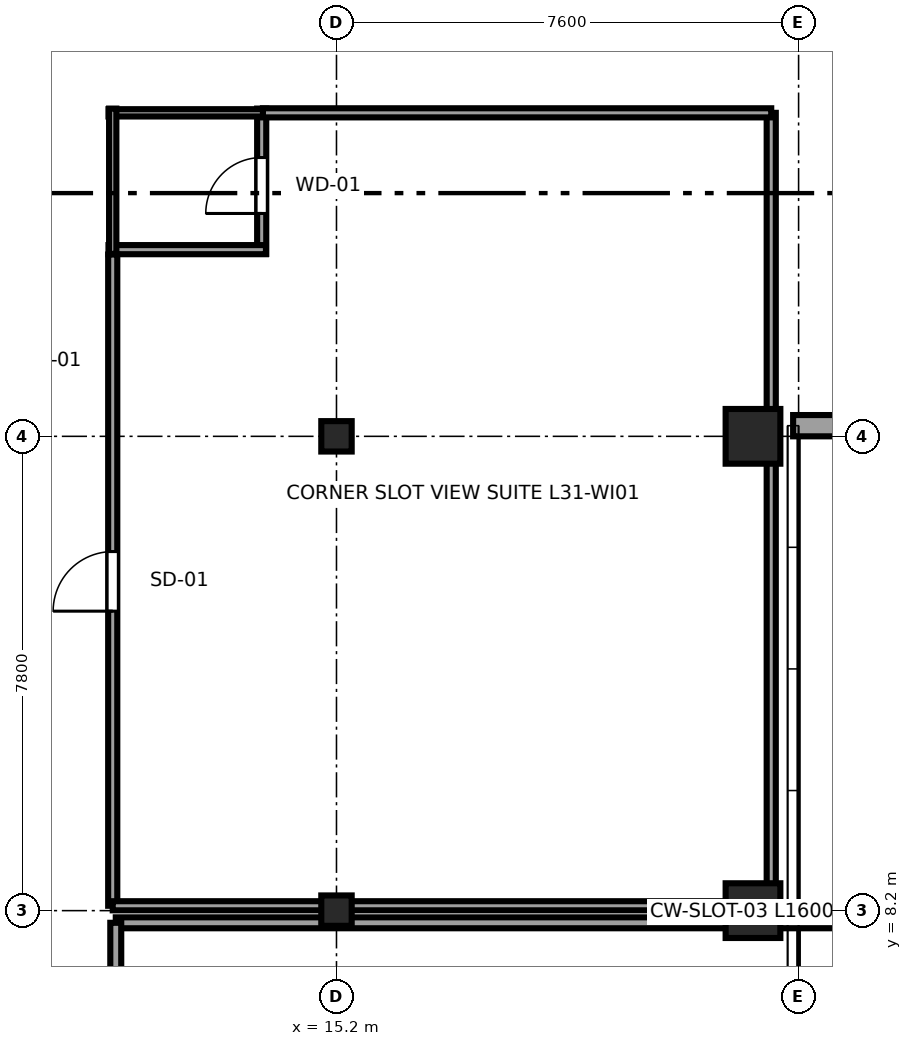
"""IFC4 building model, lengths in metres.
Left out: names, types, materials, properties, quantities, classifications, styles, units other than length and angle.
Written with IfcOpenShell. Run it as: python <this file> out.ifc"""

import sys

from ifc_helpers import new_model, si_unit, direction, frame, frame_2d, origin, origin_2d, place, context, subcontext, project, spatial, rectangle, i_section, extrude, source, transform, mapped, element, fill, save


model = new_model("IFC4")
c1 = context("Model", 3, precision=1e-05, world=origin(), true_north=direction((0.0, 1.0)))
c2 = subcontext(c1, "Body", "Model", "MODEL_VIEW")
j1 = project(units=[si_unit("LENGTHUNIT", "METRE"), si_unit("PLANEANGLEUNIT", "RADIAN")], contexts=[c1])
p1 = place(None, origin())
s1 = spatial("IfcSite", under=j1, at=p1, CompositionType="ELEMENT")
p2 = place(p1, origin())
s2 = spatial("IfcBuilding", under=s1, at=p2, CompositionType="ELEMENT")
p3 = place(p2, frame((0.0, 0.0, 122.2)))
s3 = spatial("IfcBuildingStorey", under=s2, at=p3, CompositionType="ELEMENT", Elevation=122.2)
m1 = source(origin(), c2, "Body", "SweptSolid", [
    extrude(i_section(OverallWidth=0.5, OverallDepth=0.5, WebThickness=0.022, FlangeThickness=0.034, at=origin_2d()), origin(), (0.0, 0.0, 1.0), 3.55),
])
for number, where, z_axis, x_axis in (
    (1, (15.2, 8.2, 0.0), (0.0, 0.0, 1.0), (1.0, 0.0, 0.0)),
    (2, (15.2, 16.0, 0.0), (0.0, 0.0, 1.0), (1.0, 0.0, 0.0)),
):
    element("IfcColumn", number, at=place(p3, frame(where, z_axis=z_axis, x_axis=x_axis)), inside=s3, PredefinedType="COLUMN", context=c2, shape_type="MappedRepresentation", body=[
        mapped(m1, transform((0.0, 0.0, 0.0), x_axis=(1.0, 0.0, 0.0), y_axis=(0.0, 1.0, 0.0), z_axis=(0.0, 0.0, 1.0), scale=1.0)),
    ])
m2 = source(origin(), c2, "Body", "SweptSolid", [
    extrude(rectangle(XDim=0.9, YDim=0.9, at=origin_2d()), origin(), (0.0, 0.0, 1.0), 3.55),
])
for number, where, z_axis, x_axis in (
    (3, (22.05, 8.2, 0.0), (0.0, 0.0, 1.0), (1.0, 0.0, 0.0)),
    (4, (22.05, 16.0, 0.0), (0.0, 0.0, 1.0), (1.0, 0.0, 0.0)),
):
    element("IfcColumn", number, at=place(p3, frame(where, z_axis=z_axis, x_axis=x_axis)), inside=s3, PredefinedType="COLUMN", context=c2, shape_type="MappedRepresentation", body=[
        mapped(m2, transform((0.0, 0.0, 0.0), x_axis=(1.0, 0.0, 0.0), y_axis=(0.0, 1.0, 0.0), z_axis=(0.0, 0.0, 1.0), scale=1.0)),
    ])
p4 = place(p3, frame((22.71, 16.175, 0.0), z_axis=(0.0, 0.0, 1.0), x_axis=(1.0, 0.0, 0.0)))
e5 = element("IfcWall", 5, at=p4, inside=s3, PredefinedType="SOLIDWALL", context=c2, shape_type="SweptSolid", body=[
    extrude(rectangle(XDim=11.58, YDim=0.35, at=frame_2d((5.79, 0.0))), origin(), (0.0, 0.0, 1.0), 2.748),
])
p5 = place(p4, frame((2.22, 0.0, 0.68)))
e6 = element("IfcOpeningElement", 6, at=p5, cuts=e5, PredefinedType="OPENING", context=c2, shape_type="SweptSolid", body=[
    extrude(rectangle(XDim=1.95, YDim=1.82, at=frame_2d((0.975, 0.91))), frame((0.0, 0.185, 0.0), z_axis=(0.0, -1.0, 0.0), x_axis=(1.0, 0.0, 0.0)), (0.0, 0.0, 1.0), 0.37),
])
p6 = place(p4, frame((7.41, 0.0, 0.68)))
e7 = element("IfcOpeningElement", 7, at=p6, cuts=e5, PredefinedType="OPENING", context=c2, shape_type="SweptSolid", body=[
    extrude(rectangle(XDim=1.95, YDim=1.82, at=frame_2d((0.975, 0.91))), frame((0.0, 0.185, 0.0), z_axis=(0.0, -1.0, 0.0), x_axis=(1.0, 0.0, 0.0)), (0.0, 0.0, 1.0), 0.37),
])
p7 = place(p3, frame((13.97, 19.0, 0.0), z_axis=(0.0, 0.0, 1.0), x_axis=(0.0, 1.0, 0.0)))
e8 = element("IfcWall", 8, at=p7, inside=s3, PredefinedType="PARTITIONING", context=c2, shape_type="SweptSolid", body=[
    extrude(rectangle(XDim=2.39, YDim=0.15, at=frame_2d((1.195, 0.0))), origin(), (0.0, 0.0, 1.0), 3.37),
])
p8 = place(p7, frame((0.665, 0.0, 0.0)))
e9 = element("IfcOpeningElement", 9, at=p8, cuts=e8, PredefinedType="OPENING", context=c2, shape_type="SweptSolid", body=[
    extrude(rectangle(XDim=0.92, YDim=2.01, at=frame_2d((0.46, 1.005))), frame((0.0, 0.085, 0.0), z_axis=(0.0, -1.0, 0.0), x_axis=(1.0, 0.0, 0.0)), (0.0, 0.0, 1.0), 0.17),
])
p9 = place(p3, frame((11.45, 19.07, 0.0), z_axis=(0.0, 0.0, 1.0), x_axis=(1.0, 0.0, 0.0)))
e10 = element("IfcWall", 10, at=p9, inside=s3, PredefinedType="PARTITIONING", context=c2, shape_type="SweptSolid", body=[
    extrude(rectangle(XDim=2.59, YDim=0.15, at=frame_2d((1.295, 0.0))), origin(), (0.0, 0.0, 1.0), 3.37),
])
p10 = place(p3, frame((11.45, 21.32, 0.0), z_axis=(0.0, 0.0, 1.0), x_axis=(1.0, 0.0, 0.0)))
e11 = element("IfcWall", 11, at=p10, inside=s3, PredefinedType="PLUMBINGWALL", context=c2, shape_type="SweptSolid", body=[
    extrude(rectangle(XDim=2.59, YDim=0.12, at=frame_2d((1.295, 0.0))), origin(), (0.0, 0.0, 1.0), 3.37),
])
p11 = place(p3, frame((11.52, 19.0, 0.0), z_axis=(0.0, 0.0, 1.0), x_axis=(0.0, 1.0, 0.0)))
e12 = element("IfcWall", 12, at=p11, inside=s3, PredefinedType="PLUMBINGWALL", context=c2, shape_type="SweptSolid", body=[
    extrude(rectangle(XDim=2.39, YDim=0.12, at=frame_2d((1.195, 0.0))), origin(), (0.0, 0.0, 1.0), 2.954),
])
p12 = place(p3, frame((11.52, 8.28, 0.0), z_axis=(0.0, 0.0, 1.0), x_axis=(0.0, 1.0, 0.0)))
e13 = element("IfcWall", 13, at=p12, inside=s3, PredefinedType="PARTITIONING", context=c2, shape_type="SweptSolid", body=[
    extrude(rectangle(XDim=10.71, YDim=0.15, at=frame_2d((5.355, 0.0))), origin(), (0.0, 0.0, 1.0), 2.954),
])
p13 = place(p12, frame((4.845, 0.0, 0.0)))
e14 = element("IfcOpeningElement", 14, at=p13, cuts=e13, PredefinedType="OPENING", context=c2, shape_type="SweptSolid", body=[
    extrude(rectangle(XDim=0.98, YDim=2.12, at=frame_2d((0.49, 1.06))), frame((0.0, 0.085, 0.0), z_axis=(0.0, -1.0, 0.0), x_axis=(1.0, 0.0, 0.0)), (0.0, 0.0, 1.0), 0.17),
])
p14 = place(p3, frame((11.52, 8.28, 0.0), z_axis=(0.0, 0.0, 1.0), x_axis=(1.0, 0.0, 0.0)))
e15 = element("IfcWall", 15, at=p14, inside=s3, PredefinedType="PARTITIONING", context=c2, shape_type="SweptSolid", body=[
    extrude(rectangle(XDim=10.83, YDim=0.15, at=frame_2d((5.415, 0.0))), origin(), (0.0, 0.0, 1.0), 2.748),
])
p15 = place(p3, frame((22.35, 8.28, 0.0), z_axis=(0.0, 0.0, 1.0), x_axis=(0.0, 1.0, 0.0)))
e16 = element("IfcWall", 16, at=p15, inside=s3, PredefinedType="PARTITIONING", context=c2, shape_type="SweptSolid", body=[
    extrude(rectangle(XDim=13.04, YDim=0.15, at=frame_2d((6.52, 0.0))), origin(), (0.0, 0.0, 1.0), 3.37),
])
p16 = place(p3, frame((13.99, 21.32, 0.0), z_axis=(0.0, 0.0, 1.0), x_axis=(1.0, 0.0, 0.0)))
e17 = element("IfcWall", 17, at=p16, inside=s3, PredefinedType="PARTITIONING", context=c2, shape_type="SweptSolid", body=[
    extrude(rectangle(XDim=8.36, YDim=0.15, at=frame_2d((4.18, 0.0))), origin(), (0.0, 0.0, 1.0), 3.37),
])
p17 = place(p3, frame((11.57, 8.0, 0.0), z_axis=(0.0, 0.0, 1.0), x_axis=(1.0, 0.0, 0.0)))
e18 = element("IfcWall", 18, at=p17, inside=s3, PredefinedType="PARTITIONING", context=c2, shape_type="SweptSolid", body=[
    extrude(rectangle(XDim=35.11, YDim=0.18, at=frame_2d((17.555, 0.0))), origin(), (0.0, 0.0, 1.0), 3.37),
])
p18 = place(p3, frame((11.57, 2.6, 0.0), z_axis=(0.0, 0.0, 1.0), x_axis=(0.0, 1.0, 0.0)))
e19 = element("IfcWall", 19, at=p18, inside=s3, PredefinedType="PARTITIONING", context=c2, shape_type="SweptSolid", body=[
    extrude(rectangle(XDim=5.4, YDim=0.18, at=frame_2d((2.7, 0.0))), origin(), (0.0, 0.0, 1.0), 3.37),
])
p19 = place(p18, frame((1.875, 0.0, 0.0)))
e20 = element("IfcOpeningElement", 20, at=p19, cuts=e19, PredefinedType="OPENING", context=c2, shape_type="SweptSolid", body=[
    extrude(rectangle(XDim=1.65, YDim=2.15, at=frame_2d((0.825, 1.075))), frame((0.0, 0.1, 0.0), z_axis=(0.0, -1.0, 0.0), x_axis=(1.0, 0.0, 0.0)), (0.0, 0.0, 1.0), 0.2),
])
m3 = source(origin(), c2, "Body", "SweptSolid", [
    extrude(rectangle(XDim=0.92, YDim=2.01, at=frame_2d((0.46, 1.005))), frame((0.0, 0.025, 0.0), z_axis=(0.0, -1.0, 0.0), x_axis=(1.0, 0.0, 0.0)), (0.0, 0.0, 1.0), 0.05),
])
p20 = place(p8, origin())
e21 = element("IfcDoor", 21, at=p20, inside=s3, OperationType="SINGLE_SWING_LEFT", PredefinedType="DOOR", context=c2, shape_type="MappedRepresentation", body=[
    mapped(m3, transform((0.0, 0.0, 0.0), x_axis=(1.0, 0.0, 0.0), y_axis=(0.0, 1.0, 0.0), z_axis=(0.0, 0.0, 1.0), scale=1.0)),
])
fill(e9, e21)
m4 = source(origin(), c2, "Body", "SweptSolid", [
    extrude(rectangle(XDim=0.98, YDim=2.12, at=frame_2d((0.49, 1.06))), frame((0.0, 0.025, 0.0), z_axis=(0.0, -1.0, 0.0), x_axis=(1.0, 0.0, 0.0)), (0.0, 0.0, 1.0), 0.05),
])
p21 = place(p13, origin())
e22 = element("IfcDoor", 22, at=p21, inside=s3, OperationType="SINGLE_SWING_LEFT", PredefinedType="DOOR", context=c2, shape_type="MappedRepresentation", body=[
    mapped(m4, transform((0.0, 0.0, 0.0), x_axis=(1.0, 0.0, 0.0), y_axis=(0.0, 1.0, 0.0), z_axis=(0.0, 0.0, 1.0), scale=1.0)),
])
fill(e14, e22)
save(model, sys.argv[1])
